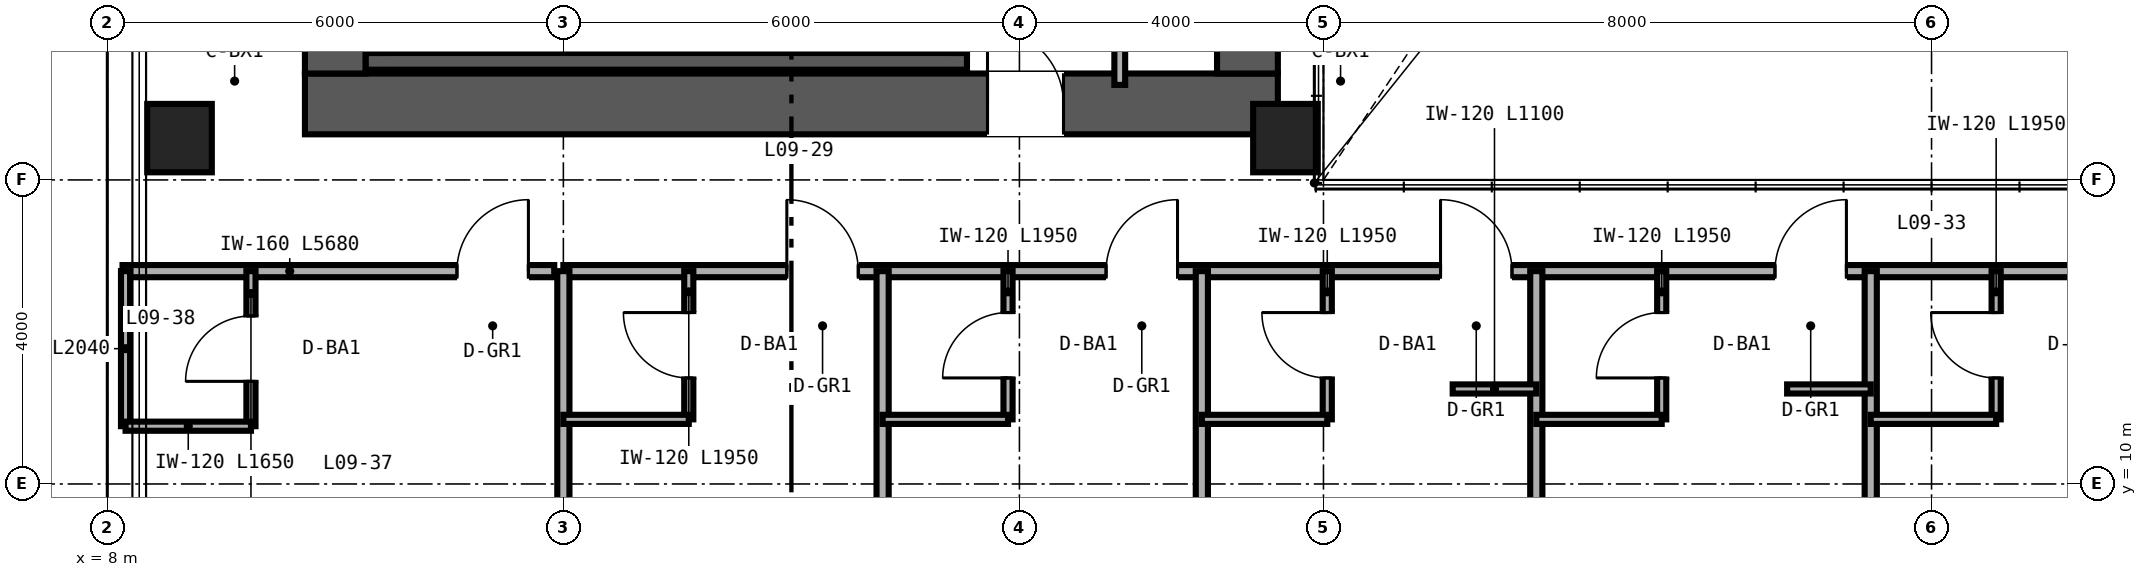
"""IFC4 building model, lengths in metres.
Left out: names, types, materials, properties, quantities, classifications, styles, units other than length and angle.
Written with IfcOpenShell. Run it as: python <this file> out.ifc"""

import sys

from ifc_helpers import new_model, si_unit, direction, frame, frame_2d, origin, origin_2d, place, context, subcontext, project, spatial, rectangle, hollow_rectangle, extrude, source, transform, mapped, element, fill, save


model = new_model("IFC4")
c1 = context("Model", 3, precision=1e-05, world=origin(), true_north=direction((0.0, 1.0)))
c2 = subcontext(c1, "Body", "Model", "MODEL_VIEW")
j1 = project(units=[si_unit("LENGTHUNIT", "METRE"), si_unit("PLANEANGLEUNIT", "RADIAN")], contexts=[c1])
p1 = place(None, origin())
s1 = spatial("IfcSite", under=j1, at=p1, CompositionType="ELEMENT")
p2 = place(p1, origin())
s2 = spatial("IfcBuilding", under=s1, at=p2, CompositionType="ELEMENT")
p3 = place(p2, frame((0.0, 0.0, 42.0)))
s3 = spatial("IfcBuildingStorey", under=s2, at=p3, CompositionType="ELEMENT", Elevation=42.0)
p4 = place(p3, frame((10.6, 15.0, 0.0), z_axis=(0.0, 0.0, 1.0), x_axis=(1.0, 0.0, 0.0)))
e1 = element("IfcWall", 1, at=p4, inside=s3, PredefinedType="SHEAR", context=c2, shape_type="SweptSolid", body=[
    extrude(rectangle(XDim=12.8, YDim=0.8, at=frame_2d((6.4, 0.0))), origin(), (0.0, 0.0, 1.0), 3.35),
])
p5 = place(p4, frame((8.98, 0.0, 0.0)))
e2 = element("IfcOpeningElement", 2, at=p5, cuts=e1, PredefinedType="OPENING", context=c2, shape_type="SweptSolid", body=[
    extrude(rectangle(XDim=1.0, YDim=2.15, at=frame_2d((0.5, 1.075))), frame((0.0, 0.41, 0.0), z_axis=(0.0, -1.0, 0.0), x_axis=(1.0, 0.0, 0.0)), (0.0, 0.0, 1.0), 0.82),
])
for number, where, z_axis, x_axis in (
    (3, (11.0, 15.4, 0.0), (0.0, 0.0, 1.0), (0.0, 1.0, 0.0)),
    (4, (23.0, 15.4, 0.0), (0.0, 0.0, 1.0), (0.0, 1.0, 0.0)),
):
    element("IfcWall", number, at=place(p3, frame(where, z_axis=z_axis, x_axis=x_axis)), inside=s3, PredefinedType="SHEAR", context=c2, shape_type="SweptSolid", body=[
        extrude(rectangle(XDim=21.2, YDim=0.8, at=frame_2d((10.6, 0.0))), origin(), (0.0, 0.0, 1.0), 3.35),
    ])
p6 = place(p3, frame((11.4, 15.56, 0.0), z_axis=(0.0, 0.0, 1.0), x_axis=(1.0, 0.0, 0.0)))
e5 = element("IfcWall", 5, at=p6, inside=s3, PredefinedType="SHEAR", context=c2, shape_type="SweptSolid", body=[
    extrude(rectangle(XDim=7.91, YDim=0.22, at=frame_2d((3.955, 0.0))), origin(), (0.0, 0.0, 1.0), 3.4),
])
for number, where, z_axis, x_axis in (
    (6, (11.56, 15.67, 0.0), (0.0, 0.0, 1.0), (0.0, 1.0, 0.0)),
    (7, (19.2, 15.67, 0.0), (0.0, 0.0, 1.0), (0.0, 1.0, 0.0)),
):
    element("IfcWall", number, at=place(p3, frame(where, z_axis=z_axis, x_axis=x_axis)), inside=s3, PredefinedType="SHEAR", context=c2, shape_type="SweptSolid", body=[
        extrude(rectangle(XDim=3.28, YDim=0.22, at=frame_2d((1.64, 0.0))), origin(), (0.0, 0.0, 1.0), 3.4),
    ])
m1 = source(origin(), c2, "Body", "SweptSolid", [
    extrude(hollow_rectangle(XDim=0.85, YDim=0.9, WallThickness=0.04, at=origin_2d()), origin(), (0.0, 0.0, 1.0), 3.35),
])
for number, where, z_axis, x_axis in (
    (8, (8.95, 14.55, 0.0), (0.0, 0.0, 1.0), (1.0, 0.0, 0.0)),
    (9, (23.5, 14.55, 0.0), (0.0, 0.0, 1.0), (1.0, 0.0, 0.0)),
):
    element("IfcColumn", number, at=place(p3, frame(where, z_axis=z_axis, x_axis=x_axis)), inside=s3, PredefinedType="COLUMN", context=c2, shape_type="MappedRepresentation", body=[
        mapped(m1, transform((0.0, 0.0, 0.0), scale=1.0)),
    ])
p7 = place(p3, frame((21.32, 15.25, 0.0), z_axis=(0.0, 0.0, 1.0), x_axis=(0.0, 1.0, 0.0)))
e10 = element("IfcWall", 10, at=p7, inside=s3, PredefinedType="PARTITIONING", context=c2, shape_type="SweptSolid", body=[
    extrude(rectangle(XDim=3.59, YDim=0.142, at=frame_2d((1.795, 0.0))), origin(), (0.0, 0.0, 1.0), 3.35),
])
p8 = place(p7, frame((1.25, 0.0, 0.0)))
e11 = element("IfcOpeningElement", 11, at=p8, cuts=e10, PredefinedType="OPENING", context=c2, shape_type="SweptSolid", body=[
    extrude(rectangle(XDim=0.84, YDim=2.1, at=frame_2d((0.42, 1.05))), frame((0.0, 0.081, 0.0), z_axis=(0.0, -1.0, 0.0), x_axis=(1.0, 0.0, 0.0)), (0.0, 0.0, 1.0), 0.162),
])
p9 = place(p3, frame((8.2, 12.8, 0.0), z_axis=(0.0, 0.0, 1.0), x_axis=(1.0, 0.0, 0.0)))
e12 = element("IfcWall", 12, at=p9, inside=s3, PredefinedType="PARTITIONING", context=c2, shape_type="SweptSolid", body=[
    extrude(rectangle(XDim=5.68, YDim=0.16, at=frame_2d((2.84, 0.0))), origin(), (0.0, 0.0, 1.0), 3.35),
])
p10 = place(p9, frame((4.4, 0.0, 0.0)))
e13 = element("IfcOpeningElement", 13, at=p10, cuts=e12, PredefinedType="OPENING", context=c2, shape_type="SweptSolid", body=[
    extrude(rectangle(XDim=0.94, YDim=2.15, at=frame_2d((0.47, 1.075))), frame((0.0, 0.09, 0.0), z_axis=(0.0, -1.0, 0.0), x_axis=(1.0, 0.0, 0.0)), (0.0, 0.0, 1.0), 0.18),
])
p11 = place(p3, frame((9.89, 10.76, 0.0), z_axis=(0.0, 0.0, 1.0), x_axis=(0.0, 1.0, 0.0)))
e14 = element("IfcWall", 14, at=p11, inside=s3, PredefinedType="PARTITIONING", context=c2, shape_type="SweptSolid", body=[
    extrude(rectangle(XDim=2.04, YDim=0.12, at=frame_2d((1.02, 0.0))), origin(), (0.0, 0.0, 1.0), 3.35),
])
p12 = place(p11, frame((0.59, 0.0, 0.0)))
e15 = element("IfcOpeningElement", 15, at=p12, cuts=e14, PredefinedType="OPENING", context=c2, shape_type="SweptSolid", body=[
    extrude(rectangle(XDim=0.86, YDim=2.1, at=frame_2d((0.43, 1.05))), frame((0.0, 0.07, 0.0), z_axis=(0.0, -1.0, 0.0), x_axis=(1.0, 0.0, 0.0)), (0.0, 0.0, 1.0), 0.14),
])
p13 = place(p3, frame((8.24, 10.76, 0.0), z_axis=(0.0, 0.0, 1.0), x_axis=(0.0, 1.0, 0.0)))
e16 = element("IfcWall", 16, at=p13, inside=s3, PredefinedType="PARTITIONING", context=c2, shape_type="SweptSolid", body=[
    extrude(rectangle(XDim=2.04, YDim=0.12, at=frame_2d((1.02, 0.0))), origin(), (0.0, 0.0, 1.0), 3.35),
])
p14 = place(p3, frame((8.24, 10.76, 0.0), z_axis=(0.0, 0.0, 1.0), x_axis=(1.0, 0.0, 0.0)))
e17 = element("IfcWall", 17, at=p14, inside=s3, PredefinedType="PARTITIONING", context=c2, shape_type="SweptSolid", body=[
    extrude(rectangle(XDim=1.65, YDim=0.12, at=frame_2d((0.825, 0.0))), origin(), (0.0, 0.0, 1.0), 3.35),
])
p15 = place(p3, frame((14.0, 12.8, 0.0), z_axis=(0.0, 0.0, 1.0), x_axis=(1.0, 0.0, 0.0)))
e18 = element("IfcWall", 18, at=p15, inside=s3, PredefinedType="PARTITIONING", context=c2, shape_type="SweptSolid", body=[
    extrude(rectangle(XDim=36.0, YDim=0.16, at=frame_2d((18.0, 0.0))), origin(), (0.0, 0.0, 1.0), 2.571),
])
p16 = place(p15, frame((2.94, 0.0, 0.0)))
e19 = element("IfcOpeningElement", 19, at=p16, cuts=e18, PredefinedType="OPENING", context=c2, shape_type="SweptSolid", body=[
    extrude(rectangle(XDim=0.94, YDim=2.15, at=frame_2d((0.47, 1.075))), frame((0.0, 0.09, 0.0), z_axis=(0.0, -1.0, 0.0), x_axis=(1.0, 0.0, 0.0)), (0.0, 0.0, 1.0), 0.18),
])
p17 = place(p15, frame((7.14, 0.0, 0.0)))
e20 = element("IfcOpeningElement", 20, at=p17, cuts=e18, PredefinedType="OPENING", context=c2, shape_type="SweptSolid", body=[
    extrude(rectangle(XDim=0.94, YDim=2.15, at=frame_2d((0.47, 1.075))), frame((0.0, 0.09, 0.0), z_axis=(0.0, -1.0, 0.0), x_axis=(1.0, 0.0, 0.0)), (0.0, 0.0, 1.0), 0.18),
])
p18 = place(p15, frame((11.54, 0.0, 0.0)))
e21 = element("IfcOpeningElement", 21, at=p18, cuts=e18, PredefinedType="OPENING", context=c2, shape_type="SweptSolid", body=[
    extrude(rectangle(XDim=0.94, YDim=2.15, at=frame_2d((0.47, 1.075))), frame((0.0, 0.09, 0.0), z_axis=(0.0, -1.0, 0.0), x_axis=(1.0, 0.0, 0.0)), (0.0, 0.0, 1.0), 0.18),
])
p19 = place(p15, frame((15.94, 0.0, 0.0)))
e22 = element("IfcOpeningElement", 22, at=p19, cuts=e18, PredefinedType="OPENING", context=c2, shape_type="SweptSolid", body=[
    extrude(rectangle(XDim=0.94, YDim=2.15, at=frame_2d((0.47, 1.075))), frame((0.0, 0.09, 0.0), z_axis=(0.0, -1.0, 0.0), x_axis=(1.0, 0.0, 0.0)), (0.0, 0.0, 1.0), 0.18),
])
p20 = place(p15, frame((20.54, 0.0, 0.0)))
e23 = element("IfcOpeningElement", 23, at=p20, cuts=e18, PredefinedType="OPENING", context=c2, shape_type="SweptSolid", body=[
    extrude(rectangle(XDim=0.94, YDim=2.15, at=frame_2d((0.47, 1.075))), frame((0.0, 0.09, 0.0), z_axis=(0.0, -1.0, 0.0), x_axis=(1.0, 0.0, 0.0)), (0.0, 0.0, 1.0), 0.18),
])
p21 = place(p15, frame((24.84, 0.0, 0.0)))
e24 = element("IfcOpeningElement", 24, at=p21, cuts=e18, PredefinedType="OPENING", context=c2, shape_type="SweptSolid", body=[
    extrude(rectangle(XDim=0.94, YDim=2.15, at=frame_2d((0.47, 1.075))), frame((0.0, 0.09, 0.0), z_axis=(0.0, -1.0, 0.0), x_axis=(1.0, 0.0, 0.0)), (0.0, 0.0, 1.0), 0.18),
])
p22 = place(p15, frame((29.94, 0.0, 0.0)))
e25 = element("IfcOpeningElement", 25, at=p22, cuts=e18, PredefinedType="OPENING", context=c2, shape_type="SweptSolid", body=[
    extrude(rectangle(XDim=0.94, YDim=2.15, at=frame_2d((0.47, 1.075))), frame((0.0, 0.09, 0.0), z_axis=(0.0, -1.0, 0.0), x_axis=(1.0, 0.0, 0.0)), (0.0, 0.0, 1.0), 0.18),
])
p23 = place(p15, frame((34.74, 0.0, 0.0)))
e26 = element("IfcOpeningElement", 26, at=p23, cuts=e18, PredefinedType="OPENING", context=c2, shape_type="SweptSolid", body=[
    extrude(rectangle(XDim=0.94, YDim=2.15, at=frame_2d((0.47, 1.075))), frame((0.0, 0.09, 0.0), z_axis=(0.0, -1.0, 0.0), x_axis=(1.0, 0.0, 0.0)), (0.0, 0.0, 1.0), 0.18),
])
for number, where, z_axis, x_axis in (
    (27, (14.0, 2.36, 0.0), (0.0, 0.0, 1.0), (0.0, 1.0, 0.0)),
    (28, (18.2, 2.36, 0.0), (0.0, 0.0, 1.0), (0.0, 1.0, 0.0)),
):
    element("IfcWall", number, at=place(p3, frame(where, z_axis=z_axis, x_axis=x_axis)), inside=s3, PredefinedType="PARTITIONING", context=c2, shape_type="SweptSolid", body=[
        extrude(rectangle(XDim=10.44, YDim=0.16, at=frame_2d((5.22, 0.0))), origin(), (0.0, 0.0, 1.0), 2.657),
    ])
p24 = place(p3, frame((15.65, 10.85, 0.0), z_axis=(0.0, 0.0, 1.0), x_axis=(0.0, 1.0, 0.0)))
e29 = element("IfcWall", 29, at=p24, inside=s3, PredefinedType="PARTITIONING", context=c2, shape_type="SweptSolid", body=[
    extrude(rectangle(XDim=1.95, YDim=0.12, at=frame_2d((0.975, 0.0))), origin(), (0.0, 0.0, 1.0), 3.35),
])
p25 = place(p24, frame((0.545, 0.0, 0.0)))
e30 = element("IfcOpeningElement", 30, at=p25, cuts=e29, PredefinedType="OPENING", context=c2, shape_type="SweptSolid", body=[
    extrude(rectangle(XDim=0.86, YDim=2.1, at=frame_2d((0.43, 1.05))), frame((0.0, 0.07, 0.0), z_axis=(0.0, -1.0, 0.0), x_axis=(1.0, 0.0, 0.0)), (0.0, 0.0, 1.0), 0.14),
])
p26 = place(p3, frame((14.0, 10.85, 0.0), z_axis=(0.0, 0.0, 1.0), x_axis=(1.0, 0.0, 0.0)))
e31 = element("IfcWall", 31, at=p26, inside=s3, PredefinedType="PARTITIONING", context=c2, shape_type="SweptSolid", body=[
    extrude(rectangle(XDim=1.65, YDim=0.12, at=frame_2d((0.825, 0.0))), origin(), (0.0, 0.0, 1.0), 3.35),
])
p27 = place(p3, frame((22.4, 2.36, 0.0), z_axis=(0.0, 0.0, 1.0), x_axis=(0.0, 1.0, 0.0)))
e32 = element("IfcWall", 32, at=p27, inside=s3, PredefinedType="PARTITIONING", context=c2, shape_type="SweptSolid", body=[
    extrude(rectangle(XDim=10.44, YDim=0.16, at=frame_2d((5.22, 0.0))), origin(), (0.0, 0.0, 1.0), 2.813),
])
p28 = place(p3, frame((19.85, 10.85, 0.0), z_axis=(0.0, 0.0, 1.0), x_axis=(0.0, 1.0, 0.0)))
e33 = element("IfcWall", 33, at=p28, inside=s3, PredefinedType="PARTITIONING", context=c2, shape_type="SweptSolid", body=[
    extrude(rectangle(XDim=1.95, YDim=0.12, at=frame_2d((0.975, 0.0))), origin(), (0.0, 0.0, 1.0), 3.35),
])
p29 = place(p28, frame((0.545, 0.0, 0.0)))
e34 = element("IfcOpeningElement", 34, at=p29, cuts=e33, PredefinedType="OPENING", context=c2, shape_type="SweptSolid", body=[
    extrude(rectangle(XDim=0.86, YDim=2.1, at=frame_2d((0.43, 1.05))), frame((0.0, 0.07, 0.0), z_axis=(0.0, -1.0, 0.0), x_axis=(1.0, 0.0, 0.0)), (0.0, 0.0, 1.0), 0.14),
])
p30 = place(p3, frame((18.2, 10.85, 0.0), z_axis=(0.0, 0.0, 1.0), x_axis=(1.0, 0.0, 0.0)))
e35 = element("IfcWall", 35, at=p30, inside=s3, PredefinedType="PARTITIONING", context=c2, shape_type="SweptSolid", body=[
    extrude(rectangle(XDim=1.65, YDim=0.12, at=frame_2d((0.825, 0.0))), origin(), (0.0, 0.0, 1.0), 3.35),
])
p31 = place(p3, frame((26.8, 2.36, 0.0), z_axis=(0.0, 0.0, 1.0), x_axis=(0.0, 1.0, 0.0)))
e36 = element("IfcWall", 36, at=p31, inside=s3, PredefinedType="PARTITIONING", context=c2, shape_type="SweptSolid", body=[
    extrude(rectangle(XDim=10.44, YDim=0.16, at=frame_2d((5.22, 0.0))), origin(), (0.0, 0.0, 1.0), 2.423),
])
p32 = place(p3, frame((24.05, 10.85, 0.0), z_axis=(0.0, 0.0, 1.0), x_axis=(0.0, 1.0, 0.0)))
e37 = element("IfcWall", 37, at=p32, inside=s3, PredefinedType="PARTITIONING", context=c2, shape_type="SweptSolid", body=[
    extrude(rectangle(XDim=1.95, YDim=0.12, at=frame_2d((0.975, 0.0))), origin(), (0.0, 0.0, 1.0), 3.35),
])
p33 = place(p32, frame((0.545, 0.0, 0.0)))
e38 = element("IfcOpeningElement", 38, at=p33, cuts=e37, PredefinedType="OPENING", context=c2, shape_type="SweptSolid", body=[
    extrude(rectangle(XDim=0.86, YDim=2.1, at=frame_2d((0.43, 1.05))), frame((0.0, 0.07, 0.0), z_axis=(0.0, -1.0, 0.0), x_axis=(1.0, 0.0, 0.0)), (0.0, 0.0, 1.0), 0.14),
])
p34 = place(p3, frame((22.4, 10.85, 0.0), z_axis=(0.0, 0.0, 1.0), x_axis=(1.0, 0.0, 0.0)))
e39 = element("IfcWall", 39, at=p34, inside=s3, PredefinedType="PARTITIONING", context=c2, shape_type="SweptSolid", body=[
    extrude(rectangle(XDim=1.65, YDim=0.12, at=frame_2d((0.825, 0.0))), origin(), (0.0, 0.0, 1.0), 2.571),
])
p35 = place(p3, frame((25.7, 11.25, 0.0), z_axis=(0.0, 0.0, 1.0), x_axis=(1.0, 0.0, 0.0)))
e40 = element("IfcWall", 40, at=p35, inside=s3, PredefinedType="PARTITIONING", context=c2, shape_type="SweptSolid", body=[
    extrude(rectangle(XDim=1.1, YDim=0.12, at=frame_2d((0.55, 0.0))), origin(), (0.0, 0.0, 1.0), 3.35),
])
p36 = place(p3, frame((31.2, 2.36, 0.0), z_axis=(0.0, 0.0, 1.0), x_axis=(0.0, 1.0, 0.0)))
e41 = element("IfcWall", 41, at=p36, inside=s3, PredefinedType="PARTITIONING", context=c2, shape_type="SweptSolid", body=[
    extrude(rectangle(XDim=10.44, YDim=0.16, at=frame_2d((5.22, 0.0))), origin(), (0.0, 0.0, 1.0), 2.423),
])
p37 = place(p3, frame((28.45, 10.85, 0.0), z_axis=(0.0, 0.0, 1.0), x_axis=(0.0, 1.0, 0.0)))
e42 = element("IfcWall", 42, at=p37, inside=s3, PredefinedType="PARTITIONING", context=c2, shape_type="SweptSolid", body=[
    extrude(rectangle(XDim=1.95, YDim=0.12, at=frame_2d((0.975, 0.0))), origin(), (0.0, 0.0, 1.0), 3.35),
])
p38 = place(p37, frame((0.545, 0.0, 0.0)))
e43 = element("IfcOpeningElement", 43, at=p38, cuts=e42, PredefinedType="OPENING", context=c2, shape_type="SweptSolid", body=[
    extrude(rectangle(XDim=0.86, YDim=2.1, at=frame_2d((0.43, 1.05))), frame((0.0, 0.07, 0.0), z_axis=(0.0, -1.0, 0.0), x_axis=(1.0, 0.0, 0.0)), (0.0, 0.0, 1.0), 0.14),
])
p39 = place(p3, frame((26.8, 10.85, 0.0), z_axis=(0.0, 0.0, 1.0), x_axis=(1.0, 0.0, 0.0)))
e44 = element("IfcWall", 44, at=p39, inside=s3, PredefinedType="PARTITIONING", context=c2, shape_type="SweptSolid", body=[
    extrude(rectangle(XDim=1.65, YDim=0.12, at=frame_2d((0.825, 0.0))), origin(), (0.0, 0.0, 1.0), 3.35),
])
p40 = place(p3, frame((30.1, 11.25, 0.0), z_axis=(0.0, 0.0, 1.0), x_axis=(1.0, 0.0, 0.0)))
e45 = element("IfcWall", 45, at=p40, inside=s3, PredefinedType="PARTITIONING", context=c2, shape_type="SweptSolid", body=[
    extrude(rectangle(XDim=1.1, YDim=0.12, at=frame_2d((0.55, 0.0))), origin(), (0.0, 0.0, 1.0), 3.35),
])
p41 = place(p3, frame((32.85, 10.85, 0.0), z_axis=(0.0, 0.0, 1.0), x_axis=(0.0, 1.0, 0.0)))
e46 = element("IfcWall", 46, at=p41, inside=s3, PredefinedType="PARTITIONING", context=c2, shape_type="SweptSolid", body=[
    extrude(rectangle(XDim=1.95, YDim=0.12, at=frame_2d((0.975, 0.0))), origin(), (0.0, 0.0, 1.0), 3.35),
])
p42 = place(p41, frame((0.545, 0.0, 0.0)))
e47 = element("IfcOpeningElement", 47, at=p42, cuts=e46, PredefinedType="OPENING", context=c2, shape_type="SweptSolid", body=[
    extrude(rectangle(XDim=0.86, YDim=2.1, at=frame_2d((0.43, 1.05))), frame((0.0, 0.07, 0.0), z_axis=(0.0, -1.0, 0.0), x_axis=(1.0, 0.0, 0.0)), (0.0, 0.0, 1.0), 0.14),
])
p43 = place(p3, frame((31.2, 10.85, 0.0), z_axis=(0.0, 0.0, 1.0), x_axis=(1.0, 0.0, 0.0)))
e48 = element("IfcWall", 48, at=p43, inside=s3, PredefinedType="PARTITIONING", context=c2, shape_type="SweptSolid", body=[
    extrude(rectangle(XDim=1.65, YDim=0.12, at=frame_2d((0.825, 0.0))), origin(), (0.0, 0.0, 1.0), 3.35),
])
m2 = source(origin(), c2, "Body", "SweptSolid", [
    extrude(rectangle(XDim=1.0, YDim=2.15, at=frame_2d((0.5, 1.075))), frame((0.0, 0.025, 0.0), z_axis=(0.0, -1.0, 0.0), x_axis=(1.0, 0.0, 0.0)), (0.0, 0.0, 1.0), 0.05),
])
p44 = place(p5, origin())
e49 = element("IfcDoor", 49, at=p44, inside=s3, OperationType="SINGLE_SWING_LEFT", PredefinedType="DOOR", context=c2, shape_type="MappedRepresentation", body=[
    mapped(m2, transform((0.0, 0.0, 0.0), scale=1.0)),
])
fill(e2, e49)
m3 = source(origin(), c2, "Body", "SweptSolid", [
    extrude(rectangle(XDim=0.86, YDim=2.1, at=frame_2d((0.43, 1.05))), frame((0.0, 0.025, 0.0), z_axis=(0.0, -1.0, 0.0), x_axis=(1.0, 0.0, 0.0)), (0.0, 0.0, 1.0), 0.05),
])
p45 = place(p12, origin())
e50 = element("IfcDoor", 50, at=p45, inside=s3, OperationType="SINGLE_SWING_LEFT", PredefinedType="DOOR", context=c2, shape_type="MappedRepresentation", body=[
    mapped(m3, transform((0.0, 0.0, 0.0), scale=1.0)),
])
fill(e15, e50)
m4 = source(origin(), c2, "Body", "SweptSolid", [
    extrude(rectangle(XDim=0.94, YDim=2.15, at=frame_2d((0.47, 1.075))), frame((0.0, 0.025, 0.0), z_axis=(0.0, -1.0, 0.0), x_axis=(1.0, 0.0, 0.0)), (0.0, 0.0, 1.0), 0.05),
])
p46 = place(p10, origin())
e51 = element("IfcDoor", 51, at=p46, inside=s3, OperationType="SINGLE_SWING_RIGHT", PredefinedType="DOOR", context=c2, shape_type="MappedRepresentation", body=[
    mapped(m4, transform((0.0, 0.0, 0.0), scale=1.0)),
])
fill(e13, e51)
p47 = place(p25, origin())
e52 = element("IfcDoor", 52, at=p47, inside=s3, OperationType="SINGLE_SWING_RIGHT", PredefinedType="DOOR", context=c2, shape_type="MappedRepresentation", body=[
    mapped(m3, transform((0.0, 0.0, 0.0), scale=1.0)),
])
fill(e30, e52)
p48 = place(p29, origin())
e53 = element("IfcDoor", 53, at=p48, inside=s3, OperationType="SINGLE_SWING_LEFT", PredefinedType="DOOR", context=c2, shape_type="MappedRepresentation", body=[
    mapped(m3, transform((0.0, 0.0, 0.0), scale=1.0)),
])
fill(e34, e53)
p49 = place(p33, origin())
e54 = element("IfcDoor", 54, at=p49, inside=s3, OperationType="SINGLE_SWING_RIGHT", PredefinedType="DOOR", context=c2, shape_type="MappedRepresentation", body=[
    mapped(m3, transform((0.0, 0.0, 0.0), scale=1.0)),
])
fill(e38, e54)
p50 = place(p38, origin())
e55 = element("IfcDoor", 55, at=p50, inside=s3, OperationType="SINGLE_SWING_LEFT", PredefinedType="DOOR", context=c2, shape_type="MappedRepresentation", body=[
    mapped(m3, transform((0.0, 0.0, 0.0), scale=1.0)),
])
fill(e43, e55)
p51 = place(p42, origin())
e56 = element("IfcDoor", 56, at=p51, inside=s3, OperationType="SINGLE_SWING_RIGHT", PredefinedType="DOOR", context=c2, shape_type="MappedRepresentation", body=[
    mapped(m3, transform((0.0, 0.0, 0.0), scale=1.0)),
])
fill(e47, e56)
p52 = place(p16, origin())
e57 = element("IfcDoor", 57, at=p52, inside=s3, OperationType="SINGLE_SWING_LEFT", PredefinedType="DOOR", context=c2, shape_type="MappedRepresentation", body=[
    mapped(m4, transform((0.0, 0.0, 0.0), scale=1.0)),
])
fill(e19, e57)
p53 = place(p17, origin())
e58 = element("IfcDoor", 58, at=p53, inside=s3, OperationType="SINGLE_SWING_RIGHT", PredefinedType="DOOR", context=c2, shape_type="MappedRepresentation", body=[
    mapped(m4, transform((0.0, 0.0, 0.0), scale=1.0)),
])
fill(e20, e58)
p54 = place(p18, origin())
e59 = element("IfcDoor", 59, at=p54, inside=s3, OperationType="SINGLE_SWING_LEFT", PredefinedType="DOOR", context=c2, shape_type="MappedRepresentation", body=[
    mapped(m4, transform((0.0, 0.0, 0.0), scale=1.0)),
])
fill(e21, e59)
p55 = place(p19, origin())
e60 = element("IfcDoor", 60, at=p55, inside=s3, OperationType="SINGLE_SWING_RIGHT", PredefinedType="DOOR", context=c2, shape_type="MappedRepresentation", body=[
    mapped(m4, transform((0.0, 0.0, 0.0), scale=1.0)),
])
fill(e22, e60)
save(model, sys.argv[1])
